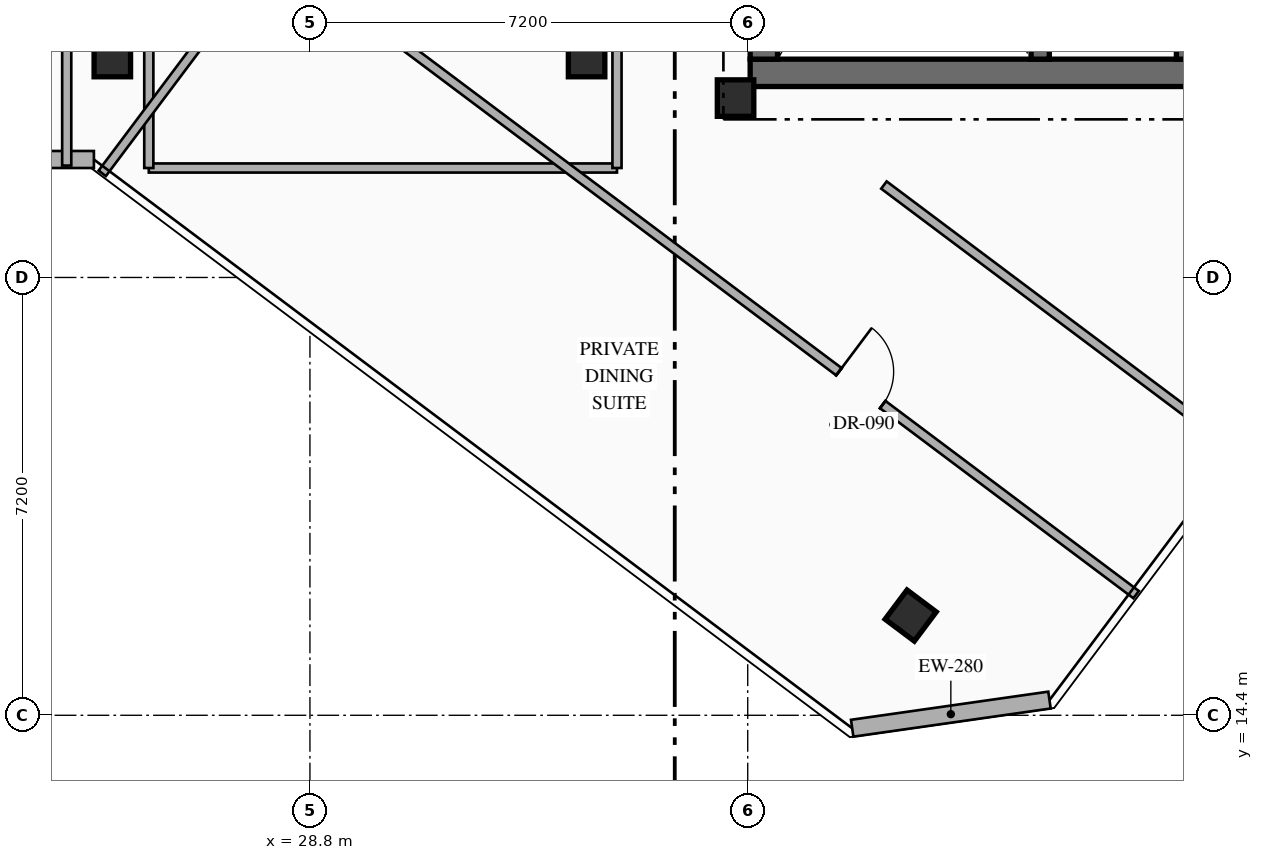
"""IFC4 building model, lengths in metres.
Left out: names, types, materials, properties, quantities, classifications, styles, units other than length and angle.
Written with IfcOpenShell. Run it as: python <this file> out.ifc"""

import sys

from ifc_helpers import new_model, si_unit, direction, frame, frame_2d, origin, origin_2d, place, context, subcontext, project, spatial, rectangle, hollow_rectangle, extrude, element, fill, save


model = new_model("IFC4")
c1 = context("Model", 3, precision=1e-05, world=origin(), true_north=direction((0.0, 1.0)))
c2 = subcontext(c1, "Body", "Model", "MODEL_VIEW")
j1 = project(units=[si_unit("LENGTHUNIT", "METRE"), si_unit("PLANEANGLEUNIT", "RADIAN")], contexts=[c1])
p1 = place(None, origin())
s1 = spatial("IfcSite", under=j1, at=p1, CompositionType="ELEMENT")
p2 = place(p1, origin())
s2 = spatial("IfcBuilding", under=s1, at=p2, CompositionType="ELEMENT")
p3 = place(p2, frame((0.0, 0.0, 265.95)))
s3 = spatial("IfcBuildingStorey", under=s2, at=p3, CompositionType="ELEMENT", Elevation=265.95)
p4 = place(p3, frame((36.04, 24.965, 0.0), z_axis=(0.0, 0.0, 1.0), x_axis=(1.0, 0.0, 0.0)))
e1 = element("IfcWall", 1, at=p4, inside=s3, PredefinedType="SHEAR", context=c2, shape_type="SweptSolid", body=[
    extrude(rectangle(XDim=7.46, YDim=0.45, at=frame_2d((3.73, 0.0))), origin(), (0.0, 0.0, 1.0), 4.0),
])
p5 = place(p3, frame((36.265, 25.19, 0.0), z_axis=(0.0, 0.0, 1.0), x_axis=(0.0, 1.0, 0.0)))
e2 = element("IfcWall", 2, at=p5, inside=s3, PredefinedType="SHEAR", context=c2, shape_type="SweptSolid", body=[
    extrude(rectangle(XDim=9.48, YDim=0.45, at=frame_2d((4.74, 0.0))), origin(), (0.0, 0.0, 1.0), 4.0),
])
p6 = place(p3, frame((43.275, 25.19, 0.0), z_axis=(0.0, 0.0, 1.0), x_axis=(0.0, 1.0, 0.0)))
e3 = element("IfcWall", 3, at=p6, inside=s3, PredefinedType="SHEAR", context=c2, shape_type="SweptSolid", body=[
    extrude(rectangle(XDim=9.48, YDim=0.45, at=frame_2d((4.74, 0.0))), origin(), (0.0, 0.0, 1.0), 4.0),
])
p7 = place(p6, frame((1.51, 0.0, 0.0)))
e4 = element("IfcOpeningElement", 4, at=p7, cuts=e3, PredefinedType="OPENING", context=c2, shape_type="SweptSolid", body=[
    extrude(rectangle(XDim=0.85, YDim=2.08, at=frame_2d((0.425, 1.04))), frame((0.0, 0.235, 0.0), z_axis=(0.0, -1.0, 0.0), x_axis=(1.0, 0.0, 0.0)), (0.0, 0.0, 1.0), 0.47),
])
p8 = place(p6, frame((4.76, 0.0, 0.0)))
e5 = element("IfcOpeningElement", 5, at=p8, cuts=e3, PredefinedType="OPENING", context=c2, shape_type="SweptSolid", body=[
    extrude(rectangle(XDim=0.85, YDim=2.08, at=frame_2d((0.425, 1.04))), frame((0.0, 0.235, 0.0), z_axis=(0.0, -1.0, 0.0), x_axis=(1.0, 0.0, 0.0)), (0.0, 0.0, 1.0), 0.47),
])
p9 = place(p3, frame((40.81, 25.19, 0.0), z_axis=(0.0, 0.0, 1.0), x_axis=(0.0, 1.0, 0.0)))
e6 = element("IfcWall", 6, at=p9, inside=s3, PredefinedType="SHEAR", context=c2, shape_type="SweptSolid", body=[
    extrude(rectangle(XDim=9.48, YDim=0.3, at=frame_2d((4.74, 0.0))), origin(), (0.0, 0.0, 1.0), 4.0),
])
for number, where, z_axis, x_axis in (
    (7, (35.8, 24.55, 0.0), (0.0, 0.0, 1.0), (1.0, 0.0, 0.0)),
    (8, (25.55, 25.2, 0.0), (0.0, 0.0, 1.0), (1.0, 0.0, 0.0)),
    (9, (33.35, 25.2, 0.0), (0.0, 0.0, 1.0), (1.0, 0.0, 0.0)),
    (10, (38.68, 16.04, 0.0), (0.0, 0.0, 1.0), (0.8, -0.6, 0.0)),
):
    element("IfcColumn", number, at=place(p3, frame(where, z_axis=z_axis, x_axis=x_axis)), inside=s3, PredefinedType="COLUMN", context=c2, shape_type="SweptSolid", body=[
        extrude(hollow_rectangle(XDim=0.6, YDim=0.6, WallThickness=0.025, at=origin_2d()), origin(), (0.0, 0.0, 1.0), 4.0),
    ])
p10 = place(p3, frame((40.963, 14.65, 0.0), z_axis=(0.0, 0.0, 1.0), x_axis=(-0.989977778067, -0.141223223777, 0.0)))
e11 = element("IfcWall", 11, at=p10, inside=s3, PredefinedType="STANDARD", context=c2, shape_type="SweptSolid", body=[
    extrude(rectangle(XDim=3.278, YDim=0.28, at=frame_2d((1.639, 0.0))), origin(), (0.0, 0.0, 1.0), 3.75),
])
p11 = place(p3, frame((25.247, 23.54, 0.0), z_axis=(0.0, 0.0, 1.0), x_axis=(-1.0, 0.0, 0.0)))
e12 = element("IfcWall", 12, at=p11, inside=s3, PredefinedType="STANDARD", context=c2, shape_type="SweptSolid", body=[
    extrude(rectangle(XDim=4.789, YDim=0.28, at=frame_2d((2.395, 0.0))), origin(), (0.0, 0.0, 1.0), 3.75),
])
p12 = place(p3, frame((26.15, 23.4, 0.0), z_axis=(0.0, 0.0, 1.0), x_axis=(1.0, 0.0, 0.0)))
e13 = element("IfcWall", 13, at=p12, inside=s3, PredefinedType="PARTITIONING", context=c2, shape_type="SweptSolid", body=[
    extrude(rectangle(XDim=7.7, YDim=0.15, at=frame_2d((3.85, 0.0))), origin(), (0.0, 0.0, 1.0), 3.75),
])
for number, where, z_axis, x_axis in (
    (14, (26.15, 23.4, 0.0), (0.0, 0.0, 1.0), (0.0, 1.0, 0.0)),
    (15, (33.85, 23.4, 0.0), (0.0, 0.0, 1.0), (0.0, 1.0, 0.0)),
):
    element("IfcWall", number, at=place(p3, frame(where, z_axis=z_axis, x_axis=x_axis)), inside=s3, PredefinedType="PARTITIONING", context=c2, shape_type="SweptSolid", body=[
        extrude(rectangle(XDim=6.65, YDim=0.15, at=frame_2d((3.325, 0.0))), origin(), (0.0, 0.0, 1.0), 3.75),
    ])
p13 = place(p3, frame((28.18, 27.04, 0.0), z_axis=(0.0, 0.0, 1.0), x_axis=(0.8, -0.6, 0.0)))
e16 = element("IfcWall", 16, at=p13, inside=s3, PredefinedType="PARTITIONING", context=c2, shape_type="SweptSolid", body=[
    extrude(rectangle(XDim=17.76, YDim=0.15, at=frame_2d((8.88, 0.0))), origin(), (0.0, 0.0, 1.0), 3.75),
])
p14 = place(p13, frame((11.65, 0.0, 0.0)))
e17 = element("IfcOpeningElement", 17, at=p14, cuts=e16, PredefinedType="OPENING", context=c2, shape_type="SweptSolid", body=[
    extrude(rectangle(XDim=0.9, YDim=2.15, at=frame_2d((0.45, 1.075))), frame((0.0, 0.085, 0.0), z_axis=(0.0, -1.0, 0.0), x_axis=(1.0, 0.0, 0.0)), (0.0, 0.0, 1.0), 0.17),
])
p15 = place(p3, frame((25.384, 23.312, 0.0), z_axis=(0.0, 0.0, 1.0), x_axis=(0.599983234706, 0.800012573696, 0.0)))
e18 = element("IfcWall", 18, at=p15, inside=s3, PredefinedType="PARTITIONING", context=c2, shape_type="SweptSolid", body=[
    extrude(rectangle(XDim=4.66, YDim=0.15, at=frame_2d((2.33, 0.0))), origin(), (0.0, 0.0, 1.0), 3.75),
])
p16 = place(p3, frame((24.8, 23.44, 0.0), z_axis=(0.0, 0.0, 1.0), x_axis=(0.0, 1.0, 0.0)))
e19 = element("IfcWall", 19, at=p16, inside=s3, PredefinedType="PARTITIONING", context=c2, shape_type="SweptSolid", body=[
    extrude(rectangle(XDim=6.96, YDim=0.15, at=frame_2d((3.48, 0.0))), origin(), (0.0, 0.0, 1.0), 3.75),
])
p17 = place(p3, frame((38.24, 23.12, 0.0), z_axis=(0.0, 0.0, 1.0), x_axis=(0.799996019408, -0.60000530742, 0.0)))
e20 = element("IfcWall", 20, at=p17, inside=s3, PredefinedType="PARTITIONING", context=c2, shape_type="SweptSolid", body=[
    extrude(rectangle(XDim=7.36, YDim=0.15, at=frame_2d((3.68, 0.0))), origin(), (0.0, 0.0, 1.0), 3.75),
])
p18 = place(p14, origin())
e21 = element("IfcDoor", 21, at=p18, inside=s3, OperationType="SINGLE_SWING_LEFT", PredefinedType="DOOR", context=c2, shape_type="SweptSolid", body=[
    extrude(rectangle(XDim=0.9, YDim=2.15, at=frame_2d((0.45, 1.075))), frame((0.0, 0.025, 0.0), z_axis=(0.0, -1.0, 0.0), x_axis=(1.0, 0.0, 0.0)), (0.0, 0.0, 1.0), 0.05),
])
fill(e17, e21)
save(model, sys.argv[1])
